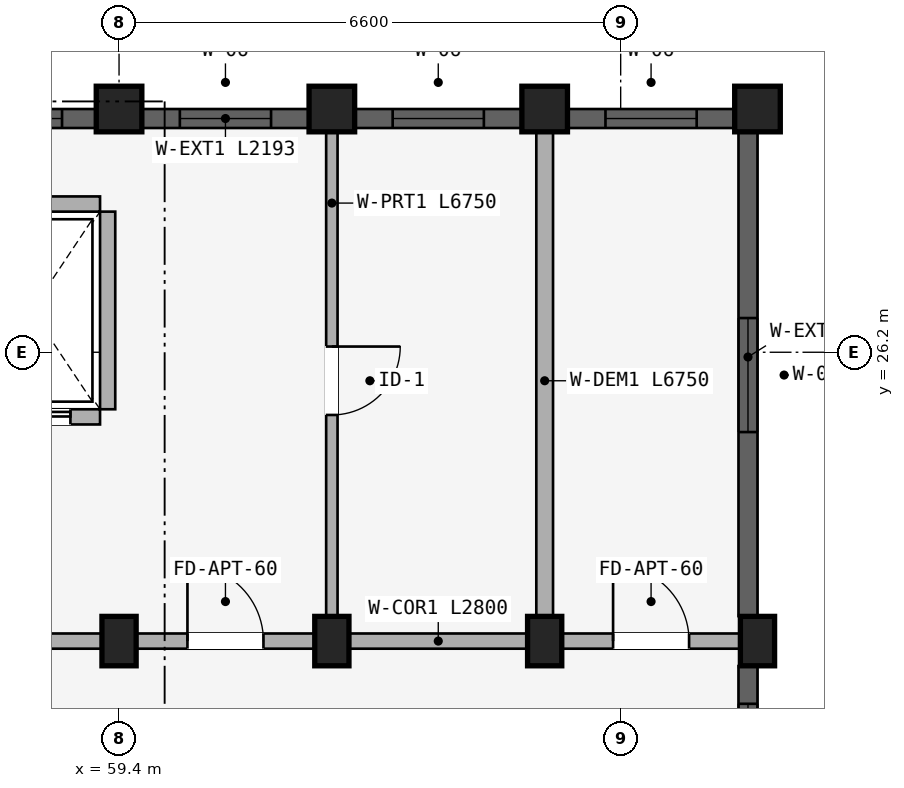
"""IFC4 building model, lengths in metres.
Left out: names, types, materials, properties, quantities, classifications, styles, units other than length and angle.
Written with IfcOpenShell. Run it as: python <this file> out.ifc"""

import sys

from ifc_helpers import new_model, si_unit, direction, frame, frame_2d, origin, origin_2d, place, context, subcontext, project, spatial, rectangle, extrude, element, fill, save


model = new_model("IFC4")
c1 = context("Model", 3, precision=1e-05, world=origin(), true_north=direction((0.0, 1.0)))
c2 = subcontext(c1, "Body", "Model", "MODEL_VIEW")
j1 = project(units=[si_unit("LENGTHUNIT", "METRE"), si_unit("PLANEANGLEUNIT", "RADIAN")], contexts=[c1])
p1 = place(None, origin())
s1 = spatial("IfcSite", under=j1, at=p1, CompositionType="ELEMENT")
p2 = place(p1, origin())
s2 = spatial("IfcBuilding", under=s1, at=p2, CompositionType="ELEMENT")
p3 = place(p2, frame((0.0, 0.0, 30.75)))
s3 = spatial("IfcBuildingStorey", under=s2, at=p3, CompositionType="ELEMENT", Elevation=30.75)
p4 = place(p3, frame((59.4, 29.4, 0.0), z_axis=(0.0, 0.0, 1.0), x_axis=(1.0, 0.0, 0.0)))
e1 = element("IfcColumn", 1, at=p4, inside=s3, PredefinedType="COLUMN", context=c2, shape_type="SweptSolid", body=[
    extrude(rectangle(XDim=0.6, YDim=0.6, at=origin_2d()), origin(), (0.0, 0.0, 1.0), 2.91),
])
p5 = place(p3, frame((59.4, 22.4, 0.0), z_axis=(0.0, 0.0, 1.0), x_axis=(1.0, 0.0, 0.0)))
e2 = element("IfcColumn", 2, at=p5, inside=s3, PredefinedType="COLUMN", context=c2, shape_type="SweptSolid", body=[
    extrude(rectangle(XDim=0.45, YDim=0.65, at=origin_2d()), origin(), (0.0, 0.0, 1.0), 2.91),
])
p6 = place(p3, frame((62.2, 29.4, 0.0), z_axis=(0.0, 0.0, 1.0), x_axis=(1.0, 0.0, 0.0)))
e3 = element("IfcColumn", 3, at=p6, inside=s3, PredefinedType="COLUMN", context=c2, shape_type="SweptSolid", body=[
    extrude(rectangle(XDim=0.6, YDim=0.6, at=origin_2d()), origin(), (0.0, 0.0, 1.0), 2.91),
])
p7 = place(p3, frame((62.2, 22.4, 0.0), z_axis=(0.0, 0.0, 1.0), x_axis=(1.0, 0.0, 0.0)))
e4 = element("IfcColumn", 4, at=p7, inside=s3, PredefinedType="COLUMN", context=c2, shape_type="SweptSolid", body=[
    extrude(rectangle(XDim=0.45, YDim=0.65, at=origin_2d()), origin(), (0.0, 0.0, 1.0), 2.91),
])
p8 = place(p3, frame((65.0, 29.4, 0.0), z_axis=(0.0, 0.0, 1.0), x_axis=(1.0, 0.0, 0.0)))
e5 = element("IfcColumn", 5, at=p8, inside=s3, PredefinedType="COLUMN", context=c2, shape_type="SweptSolid", body=[
    extrude(rectangle(XDim=0.6, YDim=0.6, at=origin_2d()), origin(), (0.0, 0.0, 1.0), 2.91),
])
p9 = place(p3, frame((65.0, 22.4, 0.0), z_axis=(0.0, 0.0, 1.0), x_axis=(1.0, 0.0, 0.0)))
e6 = element("IfcColumn", 6, at=p9, inside=s3, PredefinedType="COLUMN", context=c2, shape_type="SweptSolid", body=[
    extrude(rectangle(XDim=0.45, YDim=0.65, at=origin_2d()), origin(), (0.0, 0.0, 1.0), 2.91),
])
p10 = place(p3, frame((67.8, 29.4, 0.0), z_axis=(0.0, 0.0, 1.0), x_axis=(1.0, 0.0, 0.0)))
e7 = element("IfcColumn", 7, at=p10, inside=s3, PredefinedType="COLUMN", context=c2, shape_type="SweptSolid", body=[
    extrude(rectangle(XDim=0.6, YDim=0.6, at=origin_2d()), origin(), (0.0, 0.0, 1.0), 2.91),
])
p11 = place(p3, frame((67.8, 22.4, 0.0), z_axis=(0.0, 0.0, 1.0), x_axis=(1.0, 0.0, 0.0)))
e8 = element("IfcColumn", 8, at=p11, inside=s3, PredefinedType="COLUMN", context=c2, shape_type="SweptSolid", body=[
    extrude(rectangle(XDim=0.45, YDim=0.65, at=origin_2d()), origin(), (0.0, 0.0, 1.0), 2.91),
])
p12 = place(p3, frame((59.25, 28.05, 0.0), z_axis=(0.0, 0.0, 1.0), x_axis=(0.0, -1.0, 0.0)))
e9 = element("IfcWall", 9, at=p12, inside=s3, PredefinedType="STANDARD", context=c2, shape_type="SweptSolid", body=[
    extrude(rectangle(XDim=2.6, YDim=0.2, at=frame_2d((1.3, 0.0))), origin(), (0.0, 0.0, 1.0), 2.352),
])
p13 = place(p3, frame((57.35, 28.15, 0.0), z_axis=(0.0, 0.0, 1.0), x_axis=(1.0, 0.0, 0.0)))
e10 = element("IfcWall", 10, at=p13, inside=s3, PredefinedType="STANDARD", context=c2, shape_type="SweptSolid", body=[
    extrude(rectangle(XDim=1.8, YDim=0.2, at=frame_2d((0.9, 0.0))), origin(), (0.0, 0.0, 1.0), 2.91),
])
p14 = place(p3, frame((57.35, 25.35, 0.0), z_axis=(0.0, 0.0, 1.0), x_axis=(1.0, 0.0, 0.0)))
e11 = element("IfcWall", 11, at=p14, inside=s3, PredefinedType="STANDARD", context=c2, shape_type="SweptSolid", body=[
    extrude(rectangle(XDim=1.8, YDim=0.2, at=frame_2d((0.9, 0.0))), origin(), (0.0, 0.0, 1.0), 2.91),
])
p15 = place(p14, frame((0.39, 0.0, 0.0)))
e12 = element("IfcOpeningElement", 12, at=p15, cuts=e11, PredefinedType="OPENING", context=c2, shape_type="SweptSolid", body=[
    extrude(rectangle(XDim=1.02, YDim=2.15, at=frame_2d((0.51, 1.075))), frame((0.0, 0.11, 0.0), z_axis=(0.0, -1.0, 0.0), x_axis=(1.0, 0.0, 0.0)), (0.0, 0.0, 1.0), 0.22),
])
p16 = place(p3, frame((53.75, 22.4, 0.0), z_axis=(0.0, 0.0, 1.0), x_axis=(1.0, 0.0, 0.0)))
e13 = element("IfcWall", 13, at=p16, inside=s3, PredefinedType="STANDARD", context=c2, shape_type="SweptSolid", body=[
    extrude(rectangle(XDim=5.6, YDim=0.2, at=frame_2d((2.8, 0.0))), origin(), (0.0, 0.0, 1.0), 2.352),
])
p17 = place(p16, frame((1.91, 0.0, 0.0)))
e14 = element("IfcOpeningElement", 14, at=p17, cuts=e13, PredefinedType="OPENING", context=c2, shape_type="SweptSolid", body=[
    extrude(rectangle(XDim=1.22, YDim=2.15, at=frame_2d((0.61, 1.075))), frame((0.0, 0.11, 0.0), z_axis=(0.0, -1.0, 0.0), x_axis=(1.0, 0.0, 0.0)), (0.0, 0.0, 1.0), 0.22),
])
p18 = place(p3, frame((59.4, 22.4, 0.0), z_axis=(0.0, 0.0, 1.0), x_axis=(1.0, 0.0, 0.0)))
e15 = element("IfcWall", 15, at=p18, inside=s3, PredefinedType="STANDARD", context=c2, shape_type="SweptSolid", body=[
    extrude(rectangle(XDim=2.8, YDim=0.2, at=frame_2d((1.4, 0.0))), origin(), (0.0, 0.0, 1.0), 2.352),
])
p19 = place(p18, frame((0.9, 0.0, 0.0)))
e16 = element("IfcOpeningElement", 16, at=p19, cuts=e15, PredefinedType="OPENING", context=c2, shape_type="SweptSolid", body=[
    extrude(rectangle(XDim=1.0, YDim=2.15, at=frame_2d((0.5, 1.075))), frame((0.0, 0.11, 0.0), z_axis=(0.0, -1.0, 0.0), x_axis=(1.0, 0.0, 0.0)), (0.0, 0.0, 1.0), 0.22),
])
p20 = place(p3, frame((62.2, 22.4, 0.0), z_axis=(0.0, 0.0, 1.0), x_axis=(1.0, 0.0, 0.0)))
e17 = element("IfcWall", 17, at=p20, inside=s3, PredefinedType="STANDARD", context=c2, shape_type="SweptSolid", body=[
    extrude(rectangle(XDim=2.8, YDim=0.2, at=frame_2d((1.4, 0.0))), origin(), (0.0, 0.0, 1.0), 2.352),
])
p21 = place(p3, frame((65.0, 22.4, 0.0), z_axis=(0.0, 0.0, 1.0), x_axis=(1.0, 0.0, 0.0)))
e18 = element("IfcWall", 18, at=p21, inside=s3, PredefinedType="STANDARD", context=c2, shape_type="SweptSolid", body=[
    extrude(rectangle(XDim=2.8, YDim=0.2, at=frame_2d((1.4, 0.0))), origin(), (0.0, 0.0, 1.0), 2.352),
])
p22 = place(p21, frame((0.9, 0.0, 0.0)))
e19 = element("IfcOpeningElement", 19, at=p22, cuts=e18, PredefinedType="OPENING", context=c2, shape_type="SweptSolid", body=[
    extrude(rectangle(XDim=1.0, YDim=2.15, at=frame_2d((0.5, 1.075))), frame((0.0, 0.11, 0.0), z_axis=(0.0, -1.0, 0.0), x_axis=(1.0, 0.0, 0.0)), (0.0, 0.0, 1.0), 0.22),
])
p23 = place(p3, frame((62.2, 29.2, 0.0), z_axis=(0.0, 0.0, 1.0), x_axis=(0.0, -1.0, 0.0)))
e20 = element("IfcWall", 20, at=p23, inside=s3, PredefinedType="PARTITIONING", context=c2, shape_type="SweptSolid", body=[
    extrude(rectangle(XDim=6.75, YDim=0.15, at=frame_2d((3.375, 0.0))), origin(), (0.0, 0.0, 1.0), 2.352),
])
p24 = place(p23, frame((2.925, 0.0, 0.0)))
e21 = element("IfcOpeningElement", 21, at=p24, cuts=e20, PredefinedType="OPENING", context=c2, shape_type="SweptSolid", body=[
    extrude(rectangle(XDim=0.9, YDim=2.1, at=frame_2d((0.45, 1.05))), frame((0.0, 0.085, 0.0), z_axis=(0.0, -1.0, 0.0), x_axis=(1.0, 0.0, 0.0)), (0.0, 0.0, 1.0), 0.17),
])
p25 = place(p3, frame((65.0, 29.2, 0.0), z_axis=(0.0, 0.0, 1.0), x_axis=(0.0, -1.0, 0.0)))
e22 = element("IfcWall", 22, at=p25, inside=s3, PredefinedType="STANDARD", context=c2, shape_type="SweptSolid", body=[
    extrude(rectangle(XDim=6.75, YDim=0.22, at=frame_2d((3.375, 0.0))), origin(), (0.0, 0.0, 1.0), 2.352),
])
p26 = place(p3, frame((56.628, 29.275, 0.0), z_axis=(0.0, 0.0, 1.0), x_axis=(1.0, 0.0, 0.0)))
e23 = element("IfcWall", 23, at=p26, inside=s3, PredefinedType="STANDARD", context=c2, shape_type="SweptSolid", body=[
    extrude(rectangle(XDim=2.468, YDim=0.25, at=frame_2d((1.234, 0.0))), origin(), (0.0, 0.0, 1.0), 2.452),
])
p27 = place(p26, frame((0.822, 0.0, 0.752)))
e24 = element("IfcOpeningElement", 24, at=p27, cuts=e23, PredefinedType="OPENING", context=c2, shape_type="SweptSolid", body=[
    extrude(rectangle(XDim=1.2, YDim=1.5, at=frame_2d((0.6, 0.75))), frame((0.0, 0.135, 0.0), z_axis=(0.0, -1.0, 0.0), x_axis=(1.0, 0.0, 0.0)), (0.0, 0.0, 1.0), 0.27),
])
p28 = place(p3, frame((59.704, 29.275, 0.0), z_axis=(0.0, 0.0, 1.0), x_axis=(1.0, 0.0, 0.0)))
e25 = element("IfcWall", 25, at=p28, inside=s3, PredefinedType="STANDARD", context=c2, shape_type="SweptSolid", body=[
    extrude(rectangle(XDim=2.193, YDim=0.25, at=frame_2d((1.096, 0.0))), origin(), (0.0, 0.0, 1.0), 2.452),
])
p29 = place(p28, frame((0.497, 0.0, 0.752)))
e26 = element("IfcOpeningElement", 26, at=p29, cuts=e25, PredefinedType="OPENING", context=c2, shape_type="SweptSolid", body=[
    extrude(rectangle(XDim=1.2, YDim=1.5, at=frame_2d((0.6, 0.75))), frame((0.0, 0.135, 0.0), z_axis=(0.0, -1.0, 0.0), x_axis=(1.0, 0.0, 0.0)), (0.0, 0.0, 1.0), 0.27),
])
p30 = place(p3, frame((62.503, 29.275, 0.0), z_axis=(0.0, 0.0, 1.0), x_axis=(1.0, 0.0, 0.0)))
e27 = element("IfcWall", 27, at=p30, inside=s3, PredefinedType="STANDARD", context=c2, shape_type="SweptSolid", body=[
    extrude(rectangle(XDim=2.193, YDim=0.25, at=frame_2d((1.097, 0.0))), origin(), (0.0, 0.0, 1.0), 2.452),
])
p31 = place(p30, frame((0.497, 0.0, 0.752)))
e28 = element("IfcOpeningElement", 28, at=p31, cuts=e27, PredefinedType="OPENING", context=c2, shape_type="SweptSolid", body=[
    extrude(rectangle(XDim=1.2, YDim=1.5, at=frame_2d((0.6, 0.75))), frame((0.0, 0.135, 0.0), z_axis=(0.0, -1.0, 0.0), x_axis=(1.0, 0.0, 0.0)), (0.0, 0.0, 1.0), 0.27),
])
p32 = place(p3, frame((65.303, 29.275, 0.0), z_axis=(0.0, 0.0, 1.0), x_axis=(1.0, 0.0, 0.0)))
e29 = element("IfcWall", 29, at=p32, inside=s3, PredefinedType="STANDARD", context=c2, shape_type="SweptSolid", body=[
    extrude(rectangle(XDim=2.193, YDim=0.25, at=frame_2d((1.097, 0.0))), origin(), (0.0, 0.0, 1.0), 2.452),
])
p33 = place(p32, frame((0.497, 0.0, 0.752)))
e30 = element("IfcOpeningElement", 30, at=p33, cuts=e29, PredefinedType="OPENING", context=c2, shape_type="SweptSolid", body=[
    extrude(rectangle(XDim=1.2, YDim=1.5, at=frame_2d((0.6, 0.75))), frame((0.0, 0.135, 0.0), z_axis=(0.0, -1.0, 0.0), x_axis=(1.0, 0.0, 0.0)), (0.0, 0.0, 1.0), 0.27),
])
p34 = place(p3, frame((67.675, 29.096, 0.0), z_axis=(0.0, 0.0, 1.0), x_axis=(0.0, -1.0, 0.0)))
e31 = element("IfcWall", 31, at=p34, inside=s3, PredefinedType="STANDARD", context=c2, shape_type="SweptSolid", body=[
    extrude(rectangle(XDim=6.368, YDim=0.25, at=frame_2d((3.184, 0.0))), origin(), (0.0, 0.0, 1.0), 2.352),
])
p35 = place(p34, frame((2.447, 0.0, 0.502)))
e32 = element("IfcOpeningElement", 32, at=p35, cuts=e31, PredefinedType="OPENING", context=c2, shape_type="SweptSolid", body=[
    extrude(rectangle(XDim=1.5, YDim=1.65, at=frame_2d((0.75, 0.825))), frame((0.0, 0.135, 0.0), z_axis=(0.0, -1.0, 0.0), x_axis=(1.0, 0.0, 0.0)), (0.0, 0.0, 1.0), 0.27),
])
p36 = place(p3, frame((67.675, 22.072, 0.0), z_axis=(0.0, 0.0, 1.0), x_axis=(0.0, -1.0, 0.0)))
e33 = element("IfcWall", 33, at=p36, inside=s3, PredefinedType="STANDARD", context=c2, shape_type="SweptSolid", body=[
    extrude(rectangle(XDim=1.743, YDim=0.25, at=frame_2d((0.872, 0.0))), origin(), (0.0, 0.0, 1.0), 2.352),
])
p37 = place(p36, frame((0.497, 0.0, 0.88)))
e34 = element("IfcOpeningElement", 34, at=p37, cuts=e33, PredefinedType="OPENING", context=c2, shape_type="SweptSolid", body=[
    extrude(rectangle(XDim=0.75, YDim=1.05, at=frame_2d((0.375, 0.525))), frame((0.0, 0.135, 0.0), z_axis=(0.0, -1.0, 0.0), x_axis=(1.0, 0.0, 0.0)), (0.0, 0.0, 1.0), 0.27),
])
p38 = place(p27, origin())
e35 = element("IfcWindow", 35, at=p38, inside=s3, PartitioningType="SINGLE_PANEL", PredefinedType="WINDOW", context=c2, shape_type="SweptSolid", body=[
    extrude(rectangle(XDim=1.2, YDim=1.5, at=frame_2d((0.6, 0.75))), frame((0.0, 0.03, 0.0), z_axis=(0.0, -1.0, 0.0), x_axis=(1.0, 0.0, 0.0)), (0.0, 0.0, 1.0), 0.06),
])
fill(e24, e35)
p39 = place(p29, origin())
e36 = element("IfcWindow", 36, at=p39, inside=s3, PartitioningType="SINGLE_PANEL", PredefinedType="WINDOW", context=c2, shape_type="SweptSolid", body=[
    extrude(rectangle(XDim=1.2, YDim=1.5, at=frame_2d((0.6, 0.75))), frame((0.0, 0.03, 0.0), z_axis=(0.0, -1.0, 0.0), x_axis=(1.0, 0.0, 0.0)), (0.0, 0.0, 1.0), 0.06),
])
fill(e26, e36)
p40 = place(p31, origin())
e37 = element("IfcWindow", 37, at=p40, inside=s3, PartitioningType="SINGLE_PANEL", PredefinedType="WINDOW", context=c2, shape_type="SweptSolid", body=[
    extrude(rectangle(XDim=1.2, YDim=1.5, at=frame_2d((0.6, 0.75))), frame((0.0, 0.03, 0.0), z_axis=(0.0, -1.0, 0.0), x_axis=(1.0, 0.0, 0.0)), (0.0, 0.0, 1.0), 0.06),
])
fill(e28, e37)
p41 = place(p33, origin())
e38 = element("IfcWindow", 38, at=p41, inside=s3, PartitioningType="SINGLE_PANEL", PredefinedType="WINDOW", context=c2, shape_type="SweptSolid", body=[
    extrude(rectangle(XDim=1.2, YDim=1.5, at=frame_2d((0.6, 0.75))), frame((0.0, 0.03, 0.0), z_axis=(0.0, -1.0, 0.0), x_axis=(1.0, 0.0, 0.0)), (0.0, 0.0, 1.0), 0.06),
])
fill(e30, e38)
p42 = place(p35, origin())
e39 = element("IfcWindow", 39, at=p42, inside=s3, PartitioningType="DOUBLE_PANEL_VERTICAL", PredefinedType="WINDOW", context=c2, shape_type="SweptSolid", body=[
    extrude(rectangle(XDim=1.5, YDim=1.65, at=frame_2d((0.75, 0.825))), frame((0.0, 0.03, 0.0), z_axis=(0.0, -1.0, 0.0), x_axis=(1.0, 0.0, 0.0)), (0.0, 0.0, 1.0), 0.06),
])
fill(e32, e39)
p43 = place(p37, origin())
e40 = element("IfcWindow", 40, at=p43, inside=s3, PartitioningType="SINGLE_PANEL", PredefinedType="WINDOW", context=c2, shape_type="SweptSolid", body=[
    extrude(rectangle(XDim=0.75, YDim=1.05, at=frame_2d((0.375, 0.525))), frame((0.0, 0.03, 0.0), z_axis=(0.0, -1.0, 0.0), x_axis=(1.0, 0.0, 0.0)), (0.0, 0.0, 1.0), 0.06),
])
fill(e34, e40)
p44 = place(p15, origin())
e41 = element("IfcDoor", 41, at=p44, inside=s3, OperationType="SLIDING_TO_RIGHT", PredefinedType="DOOR", context=c2, shape_type="SweptSolid", body=[
    extrude(rectangle(XDim=1.02, YDim=2.15, at=frame_2d((0.51, 1.075))), frame((0.0, 0.025, 0.0), z_axis=(0.0, -1.0, 0.0), x_axis=(1.0, 0.0, 0.0)), (0.0, 0.0, 1.0), 0.05),
])
fill(e12, e41)
p45 = place(p19, frame((1.0, 0.0, 0.0), z_axis=(0.0, 0.0, 1.0), x_axis=(-1.0, 0.0, 0.0)))
e42 = element("IfcDoor", 42, at=p45, inside=s3, OperationType="SINGLE_SWING_RIGHT", PredefinedType="DOOR", context=c2, shape_type="SweptSolid", body=[
    extrude(rectangle(XDim=1.0, YDim=2.15, at=frame_2d((0.5, 1.075))), frame((0.0, 0.025, 0.0), z_axis=(0.0, -1.0, 0.0), x_axis=(1.0, 0.0, 0.0)), (0.0, 0.0, 1.0), 0.05),
])
fill(e16, e42)
p46 = place(p22, frame((1.0, 0.0, 0.0), z_axis=(0.0, 0.0, 1.0), x_axis=(-1.0, 0.0, 0.0)))
e43 = element("IfcDoor", 43, at=p46, inside=s3, OperationType="SINGLE_SWING_RIGHT", PredefinedType="DOOR", context=c2, shape_type="SweptSolid", body=[
    extrude(rectangle(XDim=1.0, YDim=2.15, at=frame_2d((0.5, 1.075))), frame((0.0, 0.025, 0.0), z_axis=(0.0, -1.0, 0.0), x_axis=(1.0, 0.0, 0.0)), (0.0, 0.0, 1.0), 0.05),
])
fill(e19, e43)
p47 = place(p24, frame((0.9, 0.0, 0.0), z_axis=(0.0, 0.0, 1.0), x_axis=(-1.0, 0.0, 0.0)))
e44 = element("IfcDoor", 44, at=p47, inside=s3, OperationType="SINGLE_SWING_RIGHT", PredefinedType="DOOR", context=c2, shape_type="SweptSolid", body=[
    extrude(rectangle(XDim=0.9, YDim=2.1, at=frame_2d((0.45, 1.05))), frame((0.0, 0.025, 0.0), z_axis=(0.0, -1.0, 0.0), x_axis=(1.0, 0.0, 0.0)), (0.0, 0.0, 1.0), 0.05),
])
fill(e21, e44)
save(model, sys.argv[1])
